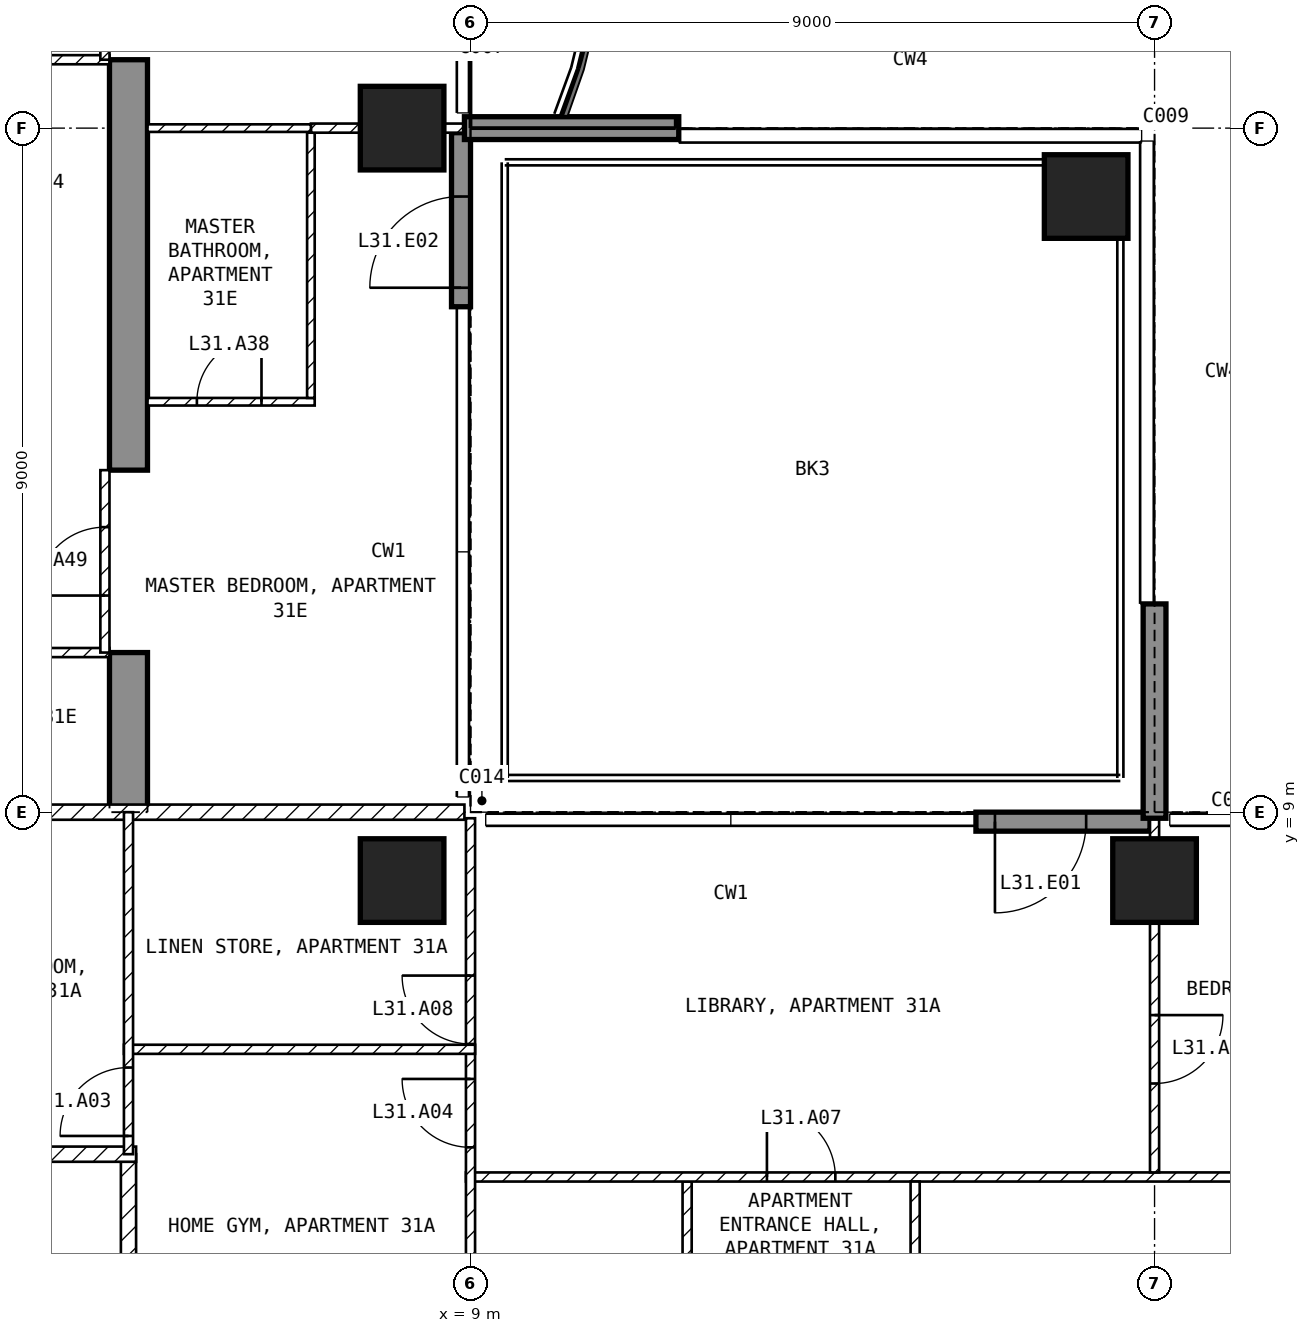
"""IFC4 building model, lengths in metres.
Left out: names, types, materials, properties, quantities, classifications, styles, units other than length and angle.
Written with IfcOpenShell. Run it as: python <this file> out.ifc"""

import sys

from ifc_helpers import new_model, si_unit, direction, frame, frame_2d, origin, origin_2d, place, context, subcontext, project, spatial, polyline, rectangle, outline, extrude, element, fill, save


model = new_model("IFC4")
c1 = context("Model", 3, precision=1e-05, world=origin(), true_north=direction((0.0, 1.0)))
c2 = subcontext(c1, "Body", "Model", "MODEL_VIEW")
j1 = project(units=[si_unit("LENGTHUNIT", "METRE"), si_unit("PLANEANGLEUNIT", "RADIAN")], contexts=[c1])
p1 = place(None, origin())
s1 = spatial("IfcSite", under=j1, at=p1, CompositionType="ELEMENT")
p2 = place(p1, origin())
s2 = spatial("IfcBuilding", under=s1, at=p2, CompositionType="ELEMENT")
p3 = place(p2, frame((0.0, 0.0, 130.4)))
s3 = spatial("IfcBuildingStorey", under=s2, at=p3, CompositionType="ELEMENT", Elevation=130.4)
for number, where, z_axis, x_axis in (
    (1, (8.1, 8.1, -0.25), (0.0, 0.0, 1.0), (1.0, 0.0, 0.0)),
    (2, (8.1, 18.0, -0.25), (0.0, 0.0, 1.0), (1.0, 0.0, 0.0)),
    (3, (18.0, 8.1, -0.25), (0.0, 0.0, 1.0), (1.0, 0.0, 0.0)),
    (4, (17.1, 17.1, -0.25), (0.0, 0.0, 1.0), (1.0, 0.0, 0.0)),
):
    element("IfcColumn", number, at=place(p3, frame(where, z_axis=z_axis, x_axis=x_axis)), inside=s3, PredefinedType="COLUMN", context=c2, shape_type="SweptSolid", body=[
        extrude(rectangle(XDim=1.1, YDim=1.1, at=origin_2d()), origin(), (0.0, 0.0, 1.0), 3.5),
    ])
p4 = place(p3, frame((4.25, 9.0, -0.25), z_axis=(1.0, 0.0, 0.0), x_axis=(0.0, 1.0, 0.0)))
e5 = element("IfcWall", 5, at=p4, inside=s3, PredefinedType="SHEAR", context=c2, shape_type="SweptSolid", body=[
    extrude(outline(polyline([(0.0, 0.0), (2.1, 0.0), (2.1, 2.65), (4.5, 2.65), (4.5, 0.0), (9.9, 0.0), (9.9, 2.65), (12.3, 2.65), (12.3, 0.0), (16.55, 0.0), (16.55, 3.5), (0.0, 3.5), (0.0, 0.0)])), origin(), (0.0, 0.0, 1.0), 0.5),
])
p5 = place(p3, frame((17.94, 8.875, 0.0), z_axis=(0.0, 0.0, 1.0), x_axis=(-1.0, 0.0, 0.0)))
e6 = element("IfcWall", 6, at=p5, inside=s3, PredefinedType="SOLIDWALL", context=c2, shape_type="SweptSolid", body=[
    extrude(rectangle(XDim=2.29, YDim=0.25, at=frame_2d((1.145, 0.0))), origin(), (0.0, 0.0, 1.0), 3.25),
])
p6 = place(p5, frame((0.84, 0.0, 0.0)))
e7 = element("IfcOpeningElement", 7, at=p6, cuts=e6, PredefinedType="OPENING", context=c2, shape_type="SweptSolid", body=[
    extrude(rectangle(XDim=1.2, YDim=2.4, at=frame_2d((0.6, 1.2))), frame((0.0, 0.135, 0.0), z_axis=(0.0, -1.0, 0.0), x_axis=(1.0, 0.0, 0.0)), (0.0, 0.0, 1.0), 0.27),
])
p7 = place(p3, frame((8.875, 15.65, 0.0), z_axis=(0.0, 0.0, 1.0), x_axis=(0.0, 1.0, 0.0)))
e8 = element("IfcWall", 8, at=p7, inside=s3, PredefinedType="SOLIDWALL", context=c2, shape_type="SweptSolid", body=[
    extrude(rectangle(XDim=2.29, YDim=0.25, at=frame_2d((1.145, 0.0))), origin(), (0.0, 0.0, 1.0), 3.25),
])
p8 = place(p7, frame((0.25, 0.0, 0.0)))
e9 = element("IfcOpeningElement", 9, at=p8, cuts=e8, PredefinedType="OPENING", context=c2, shape_type="SweptSolid", body=[
    extrude(rectangle(XDim=1.2, YDim=2.4, at=frame_2d((0.6, 1.2))), frame((0.0, 0.135, 0.0), z_axis=(0.0, -1.0, 0.0), x_axis=(1.0, 0.0, 0.0)), (0.0, 0.0, 1.0), 0.27),
])
for number, where, z_axis, x_axis in (
    (10, (8.92, 18.0, 0.0), (0.0, 0.0, 1.0), (1.0, 0.0, 0.0)),
    (11, (18.0, 8.92, 0.0), (0.0, 0.0, 1.0), (0.0, 1.0, 0.0)),
):
    element("IfcWall", number, at=place(p3, frame(where, z_axis=z_axis, x_axis=x_axis)), inside=s3, PredefinedType="SOLIDWALL", context=c2, shape_type="SweptSolid", body=[
        extrude(rectangle(XDim=2.82, YDim=0.3, at=frame_2d((1.41, 0.0))), origin(), (0.0, 0.0, 1.0), 3.25),
    ])
p9 = place(p3, frame((4.5, 4.5, 0.0), z_axis=(0.0, 0.0, 1.0), x_axis=(0.0, -1.0, 0.0)))
e12 = element("IfcWall", 12, at=p9, inside=s3, PredefinedType="PARTITIONING", context=c2, shape_type="SweptSolid", body=[
    extrude(rectangle(XDim=3.2, YDim=0.2, at=frame_2d((1.6, 0.0))), origin(), (0.0, 0.0, 1.0), 3.25),
])
p10 = place(p3, frame((1.1, 4.5, 0.0), z_axis=(0.0, 0.0, 1.0), x_axis=(1.0, 0.0, 0.0)))
e13 = element("IfcWall", 13, at=p10, inside=s3, PredefinedType="PARTITIONING", context=c2, shape_type="SweptSolid", body=[
    extrude(rectangle(XDim=3.5, YDim=0.2, at=frame_2d((1.75, 0.0))), origin(), (0.0, 0.0, 1.0), 3.25),
])
p11 = place(p3, frame((-8.92, 9.0, 0.0), z_axis=(0.0, 0.0, 1.0), x_axis=(1.0, 0.0, 0.0)))
e14 = element("IfcWall", 14, at=p11, inside=s3, PredefinedType="PARTITIONING", context=c2, shape_type="SweptSolid", body=[
    extrude(rectangle(XDim=17.84, YDim=0.2, at=frame_2d((8.92, 0.0))), origin(), (0.0, 0.0, 1.0), 3.25),
])
p12 = place(p11, frame((8.42, 0.0, 0.0)))
e15 = element("IfcOpeningElement", 15, at=p12, cuts=e14, PredefinedType="OPENING", context=c2, shape_type="SweptSolid", body=[
    extrude(rectangle(XDim=1.0, YDim=2.1, at=frame_2d((0.5, 1.05))), frame((0.0, 0.11, 0.0), z_axis=(0.0, -1.0, 0.0), x_axis=(1.0, 0.0, 0.0)), (0.0, 0.0, 1.0), 0.22),
])
p13 = place(p3, frame((11.85, 4.14, 0.0), z_axis=(0.0, 0.0, 1.0), x_axis=(0.0, -1.0, 0.0)))
e16 = element("IfcWall", 16, at=p13, inside=s3, PredefinedType="PARTITIONING", context=c2, shape_type="SweptSolid", body=[
    extrude(rectangle(XDim=2.84, YDim=0.12, at=frame_2d((1.42, 0.0))), origin(), (0.0, 0.0, 1.0), 3.25),
])
p14 = place(p13, frame((0.97, 0.0, 0.0)))
e17 = element("IfcOpeningElement", 17, at=p14, cuts=e16, PredefinedType="OPENING", context=c2, shape_type="SweptSolid", body=[
    extrude(rectangle(XDim=0.9, YDim=2.1, at=frame_2d((0.45, 1.05))), frame((0.0, 0.07, 0.0), z_axis=(0.0, -1.0, 0.0), x_axis=(1.0, 0.0, 0.0)), (0.0, 0.0, 1.0), 0.14),
])
p15 = place(p3, frame((8.94, 4.2, 0.0), z_axis=(0.0, 0.0, 1.0), x_axis=(1.0, 0.0, 0.0)))
e18 = element("IfcWall", 18, at=p15, inside=s3, PredefinedType="PARTITIONING", context=c2, shape_type="SweptSolid", body=[
    extrude(rectangle(XDim=10.71, YDim=0.12, at=frame_2d((5.355, 0.0))), origin(), (0.0, 0.0, 1.0), 3.25),
])
p16 = place(p15, frame((3.96, 0.0, 0.0)))
e19 = element("IfcOpeningElement", 19, at=p16, cuts=e18, PredefinedType="OPENING", context=c2, shape_type="SweptSolid", body=[
    extrude(rectangle(XDim=0.9, YDim=2.1, at=frame_2d((0.45, 1.05))), frame((0.0, 0.07, 0.0), z_axis=(0.0, -1.0, 0.0), x_axis=(1.0, 0.0, 0.0)), (0.0, 0.0, 1.0), 0.14),
])
p17 = place(p3, frame((9.0, 1.3, 0.0), z_axis=(0.0, 0.0, 1.0), x_axis=(0.0, 1.0, 0.0)))
e20 = element("IfcWall", 20, at=p17, inside=s3, PredefinedType="PARTITIONING", context=c2, shape_type="SweptSolid", body=[
    extrude(rectangle(XDim=7.62, YDim=0.12, at=frame_2d((3.81, 0.0))), origin(), (0.0, 0.0, 1.0), 3.25),
])
p18 = place(p17, frame((3.29, 0.0, 0.0)))
e21 = element("IfcOpeningElement", 21, at=p18, cuts=e20, PredefinedType="OPENING", context=c2, shape_type="SweptSolid", body=[
    extrude(rectangle(XDim=0.9, YDim=2.1, at=frame_2d((0.45, 1.05))), frame((0.0, 0.07, 0.0), z_axis=(0.0, -1.0, 0.0), x_axis=(1.0, 0.0, 0.0)), (0.0, 0.0, 1.0), 0.14),
])
p19 = place(p17, frame((4.65, 0.0, 0.0)))
e22 = element("IfcOpeningElement", 22, at=p19, cuts=e20, PredefinedType="OPENING", context=c2, shape_type="SweptSolid", body=[
    extrude(rectangle(XDim=0.9, YDim=2.1, at=frame_2d((0.45, 1.05))), frame((0.0, 0.07, 0.0), z_axis=(0.0, -1.0, 0.0), x_axis=(1.0, 0.0, 0.0)), (0.0, 0.0, 1.0), 0.14),
])
p20 = place(p3, frame((14.85, 4.14, 0.0), z_axis=(0.0, 0.0, 1.0), x_axis=(0.0, -1.0, 0.0)))
e23 = element("IfcWall", 23, at=p20, inside=s3, PredefinedType="PARTITIONING", context=c2, shape_type="SweptSolid", body=[
    extrude(rectangle(XDim=2.84, YDim=0.12, at=frame_2d((1.42, 0.0))), origin(), (0.0, 0.0, 1.0), 3.25),
])
p21 = place(p20, frame((0.97, 0.0, 0.0)))
e24 = element("IfcOpeningElement", 24, at=p21, cuts=e23, PredefinedType="OPENING", context=c2, shape_type="SweptSolid", body=[
    extrude(rectangle(XDim=0.9, YDim=2.1, at=frame_2d((0.45, 1.05))), frame((0.0, 0.07, 0.0), z_axis=(0.0, -1.0, 0.0), x_axis=(1.0, 0.0, 0.0)), (0.0, 0.0, 1.0), 0.14),
])
p22 = place(p3, frame((18.0, 8.92, 0.0), z_axis=(0.0, 0.0, 1.0), x_axis=(0.0, -1.0, 0.0)))
e25 = element("IfcWall", 25, at=p22, inside=s3, PredefinedType="PARTITIONING", context=c2, shape_type="SweptSolid", body=[
    extrude(rectangle(XDim=4.66, YDim=0.12, at=frame_2d((2.33, 0.0))), origin(), (0.0, 0.0, 1.0), 2.414),
])
p23 = place(p22, frame((2.59, 0.0, 0.0)))
e26 = element("IfcOpeningElement", 26, at=p23, cuts=e25, PredefinedType="OPENING", context=c2, shape_type="SweptSolid", body=[
    extrude(rectangle(XDim=0.9, YDim=2.1, at=frame_2d((0.45, 1.05))), frame((0.0, 0.07, 0.0), z_axis=(0.0, -1.0, 0.0), x_axis=(1.0, 0.0, 0.0)), (0.0, 0.0, 1.0), 0.14),
])
p24 = place(p3, frame((4.44, 5.88, 0.0), z_axis=(0.0, 0.0, 1.0), x_axis=(1.0, 0.0, 0.0)))
e27 = element("IfcWall", 27, at=p24, inside=s3, PredefinedType="PARTITIONING", context=c2, shape_type="SweptSolid", body=[
    extrude(rectangle(XDim=4.62, YDim=0.12, at=frame_2d((2.31, 0.0))), origin(), (0.0, 0.0, 1.0), 3.25),
])
p25 = place(p3, frame((4.5, 4.5, 0.0), z_axis=(0.0, 0.0, 1.0), x_axis=(0.0, 1.0, 0.0)))
e28 = element("IfcWall", 28, at=p25, inside=s3, PredefinedType="PARTITIONING", context=c2, shape_type="SweptSolid", body=[
    extrude(rectangle(XDim=4.5, YDim=0.12, at=frame_2d((2.25, 0.0))), origin(), (0.0, 0.0, 1.0), 3.25),
])
p26 = place(p25, frame((0.24, 0.0, 0.0)))
e29 = element("IfcOpeningElement", 29, at=p26, cuts=e28, PredefinedType="OPENING", context=c2, shape_type="SweptSolid", body=[
    extrude(rectangle(XDim=0.9, YDim=2.1, at=frame_2d((0.45, 1.05))), frame((0.0, 0.07, 0.0), z_axis=(0.0, -1.0, 0.0), x_axis=(1.0, 0.0, 0.0)), (0.0, 0.0, 1.0), 0.14),
])
p27 = place(p3, frame((-2.1, 11.1, 0.0), z_axis=(0.0, 0.0, 1.0), x_axis=(1.0, 0.0, 0.0)))
e30 = element("IfcWall", 30, at=p27, inside=s3, PredefinedType="PARTITIONING", context=c2, shape_type="SweptSolid", body=[
    extrude(rectangle(XDim=6.35, YDim=0.12, at=frame_2d((3.175, 0.0))), origin(), (0.0, 0.0, 1.0), 3.25),
])
p28 = place(p27, frame((2.725, 0.0, 0.0)))
e31 = element("IfcOpeningElement", 31, at=p28, cuts=e30, PredefinedType="OPENING", context=c2, shape_type="SweptSolid", body=[
    extrude(rectangle(XDim=0.9, YDim=2.1, at=frame_2d((0.45, 1.05))), frame((0.0, 0.07, 0.0), z_axis=(0.0, -1.0, 0.0), x_axis=(1.0, 0.0, 0.0)), (0.0, 0.0, 1.0), 0.14),
])
p29 = place(p3, frame((-4.25, 18.9, 0.0), z_axis=(0.0, 0.0, 1.0), x_axis=(1.0, 0.0, 0.0)))
e32 = element("IfcWall", 32, at=p29, inside=s3, PredefinedType="PARTITIONING", context=c2, shape_type="SweptSolid", body=[
    extrude(rectangle(XDim=8.5, YDim=0.12, at=frame_2d((4.25, 0.0))), origin(), (0.0, 0.0, 1.0), 3.25),
])
p30 = place(p29, frame((5.675, 0.0, 0.0)))
e33 = element("IfcOpeningElement", 33, at=p30, cuts=e32, PredefinedType="OPENING", context=c2, shape_type="SweptSolid", body=[
    extrude(rectangle(XDim=0.9, YDim=2.1, at=frame_2d((0.45, 1.05))), frame((0.0, 0.07, 0.0), z_axis=(0.0, -1.0, 0.0), x_axis=(1.0, 0.0, 0.0)), (0.0, 0.0, 1.0), 0.14),
])
p31 = place(p3, frame((4.75, 14.4, 0.0), z_axis=(0.0, 0.0, 1.0), x_axis=(1.0, 0.0, 0.0)))
e34 = element("IfcWall", 34, at=p31, inside=s3, PredefinedType="PARTITIONING", context=c2, shape_type="SweptSolid", body=[
    extrude(rectangle(XDim=2.2, YDim=0.1, at=frame_2d((1.1, 0.0))), origin(), (0.0, 0.0, 1.0), 3.25),
])
p32 = place(p31, frame((0.65, 0.0, 0.0)))
e35 = element("IfcOpeningElement", 35, at=p32, cuts=e34, PredefinedType="OPENING", context=c2, shape_type="SweptSolid", body=[
    extrude(rectangle(XDim=0.85, YDim=2.1, at=frame_2d((0.425, 1.05))), frame((0.0, 0.06, 0.0), z_axis=(0.0, -1.0, 0.0), x_axis=(1.0, 0.0, 0.0)), (0.0, 0.0, 1.0), 0.12),
])
p33 = place(p3, frame((6.9, 14.45, 0.0), z_axis=(0.0, 0.0, 1.0), x_axis=(0.0, 1.0, 0.0)))
e36 = element("IfcWall", 36, at=p33, inside=s3, PredefinedType="PARTITIONING", context=c2, shape_type="SweptSolid", body=[
    extrude(rectangle(XDim=3.49, YDim=0.1, at=frame_2d((1.745, 0.0))), origin(), (0.0, 0.0, 1.0), 3.25),
])
p34 = place(p3, frame((6.9, 18.0, 0.0), z_axis=(0.0, 0.0, 1.0), x_axis=(1.0, 0.0, 0.0)))
e37 = element("IfcWall", 37, at=p34, inside=s3, PredefinedType="PARTITIONING", context=c2, shape_type="SweptSolid", body=[
    extrude(rectangle(XDim=2.02, YDim=0.12, at=frame_2d((1.01, 0.0))), origin(), (0.0, 0.0, 1.0), 2.414),
])
p35 = place(p3, frame((4.75, 18.0, 0.0), z_axis=(0.0, 0.0, 1.0), x_axis=(1.0, 0.0, 0.0)))
e38 = element("IfcWall", 38, at=p35, inside=s3, PredefinedType="PARTITIONING", context=c2, shape_type="SweptSolid", body=[
    extrude(rectangle(XDim=2.15, YDim=0.1, at=frame_2d((1.075, 0.0))), origin(), (0.0, 0.0, 1.0), 2.414),
])
p36 = place(p3, frame((4.19, 11.1, 0.0), z_axis=(0.0, 0.0, 1.0), x_axis=(0.0, 1.0, 0.0)))
e39 = element("IfcWall", 39, at=p36, inside=s3, PredefinedType="PARTITIONING", context=c2, shape_type="SweptSolid", body=[
    extrude(rectangle(XDim=2.4, YDim=0.12, at=frame_2d((1.2, 0.0))), origin(), (0.0, 0.0, 1.0), 2.4),
])
p37 = place(p36, frame((0.75, 0.0, 0.0)))
e40 = element("IfcOpeningElement", 40, at=p37, cuts=e39, PredefinedType="OPENING", context=c2, shape_type="SweptSolid", body=[
    extrude(rectangle(XDim=0.9, YDim=2.1, at=frame_2d((0.45, 1.05))), frame((0.0, 0.07, 0.0), z_axis=(0.0, -1.0, 0.0), x_axis=(1.0, 0.0, 0.0)), (0.0, 0.0, 1.0), 0.14),
])
p38 = place(p3, frame((4.19, 18.9, 0.0), z_axis=(0.0, 0.0, 1.0), x_axis=(0.0, 1.0, 0.0)))
e41 = element("IfcWall", 41, at=p38, inside=s3, PredefinedType="PARTITIONING", context=c2, shape_type="SweptSolid", body=[
    extrude(rectangle(XDim=2.4, YDim=0.12, at=frame_2d((1.2, 0.0))), origin(), (0.0, 0.0, 1.0), 2.4),
])
p39 = place(p38, frame((0.75, 0.0, 0.0)))
e42 = element("IfcOpeningElement", 42, at=p39, cuts=e41, PredefinedType="OPENING", context=c2, shape_type="SweptSolid", body=[
    extrude(rectangle(XDim=0.9, YDim=2.1, at=frame_2d((0.45, 1.05))), frame((0.0, 0.07, 0.0), z_axis=(0.0, -1.0, 0.0), x_axis=(1.0, 0.0, 0.0)), (0.0, 0.0, 1.0), 0.14),
])
p40 = place(p6, origin())
e43 = element("IfcDoor", 43, at=p40, inside=s3, OperationType="SINGLE_SWING_RIGHT", PredefinedType="DOOR", context=c2, shape_type="SweptSolid", body=[
    extrude(rectangle(XDim=1.2, YDim=2.4, at=frame_2d((0.6, 1.2))), frame((0.0, 0.025, 0.0), z_axis=(0.0, -1.0, 0.0), x_axis=(1.0, 0.0, 0.0)), (0.0, 0.0, 1.0), 0.05),
])
fill(e7, e43)
p41 = place(p8, origin())
e44 = element("IfcDoor", 44, at=p41, inside=s3, OperationType="SINGLE_SWING_LEFT", PredefinedType="DOOR", context=c2, shape_type="SweptSolid", body=[
    extrude(rectangle(XDim=1.2, YDim=2.4, at=frame_2d((0.6, 1.2))), frame((0.0, 0.025, 0.0), z_axis=(0.0, -1.0, 0.0), x_axis=(1.0, 0.0, 0.0)), (0.0, 0.0, 1.0), 0.05),
])
fill(e9, e44)
p42 = place(p23, origin())
e45 = element("IfcDoor", 45, at=p42, inside=s3, OperationType="SINGLE_SWING_LEFT", PredefinedType="DOOR", context=c2, shape_type="SweptSolid", body=[
    extrude(rectangle(XDim=0.9, YDim=2.1, at=frame_2d((0.45, 1.05))), frame((0.0, 0.025, 0.0), z_axis=(0.0, -1.0, 0.0), x_axis=(1.0, 0.0, 0.0)), (0.0, 0.0, 1.0), 0.05),
])
fill(e26, e45)
p43 = place(p26, origin())
e46 = element("IfcDoor", 46, at=p43, inside=s3, OperationType="SINGLE_SWING_LEFT", PredefinedType="DOOR", context=c2, shape_type="SweptSolid", body=[
    extrude(rectangle(XDim=0.9, YDim=2.1, at=frame_2d((0.45, 1.05))), frame((0.0, 0.025, 0.0), z_axis=(0.0, -1.0, 0.0), x_axis=(1.0, 0.0, 0.0)), (0.0, 0.0, 1.0), 0.05),
])
fill(e29, e46)
p44 = place(p18, origin())
e47 = element("IfcDoor", 47, at=p44, inside=s3, OperationType="SINGLE_SWING_RIGHT", PredefinedType="DOOR", context=c2, shape_type="SweptSolid", body=[
    extrude(rectangle(XDim=0.9, YDim=2.1, at=frame_2d((0.45, 1.05))), frame((0.0, 0.025, 0.0), z_axis=(0.0, -1.0, 0.0), x_axis=(1.0, 0.0, 0.0)), (0.0, 0.0, 1.0), 0.05),
])
fill(e21, e47)
p45 = place(p16, origin())
e48 = element("IfcDoor", 48, at=p45, inside=s3, OperationType="SINGLE_SWING_LEFT", PredefinedType="DOOR", context=c2, shape_type="SweptSolid", body=[
    extrude(rectangle(XDim=0.9, YDim=2.1, at=frame_2d((0.45, 1.05))), frame((0.0, 0.025, 0.0), z_axis=(0.0, -1.0, 0.0), x_axis=(1.0, 0.0, 0.0)), (0.0, 0.0, 1.0), 0.05),
])
fill(e19, e48)
p46 = place(p19, origin())
e49 = element("IfcDoor", 49, at=p46, inside=s3, OperationType="SINGLE_SWING_RIGHT", PredefinedType="DOOR", context=c2, shape_type="SweptSolid", body=[
    extrude(rectangle(XDim=0.9, YDim=2.1, at=frame_2d((0.45, 1.05))), frame((0.0, 0.025, 0.0), z_axis=(0.0, -1.0, 0.0), x_axis=(1.0, 0.0, 0.0)), (0.0, 0.0, 1.0), 0.05),
])
fill(e22, e49)
p47 = place(p32, origin())
e50 = element("IfcDoor", 50, at=p47, inside=s3, OperationType="SINGLE_SWING_RIGHT", PredefinedType="DOOR", context=c2, shape_type="SweptSolid", body=[
    extrude(rectangle(XDim=0.85, YDim=2.1, at=frame_2d((0.425, 1.05))), frame((0.0, 0.025, 0.0), z_axis=(0.0, -1.0, 0.0), x_axis=(1.0, 0.0, 0.0)), (0.0, 0.0, 1.0), 0.05),
])
fill(e35, e50)
p48 = place(p37, origin())
e51 = element("IfcDoor", 51, at=p48, inside=s3, OperationType="SINGLE_SWING_LEFT", PredefinedType="DOOR", context=c2, shape_type="SweptSolid", body=[
    extrude(rectangle(XDim=0.9, YDim=2.1, at=frame_2d((0.45, 1.05))), frame((0.0, 0.025, 0.0), z_axis=(0.0, -1.0, 0.0), x_axis=(1.0, 0.0, 0.0)), (0.0, 0.0, 1.0), 0.05),
])
fill(e40, e51)
save(model, sys.argv[1])
